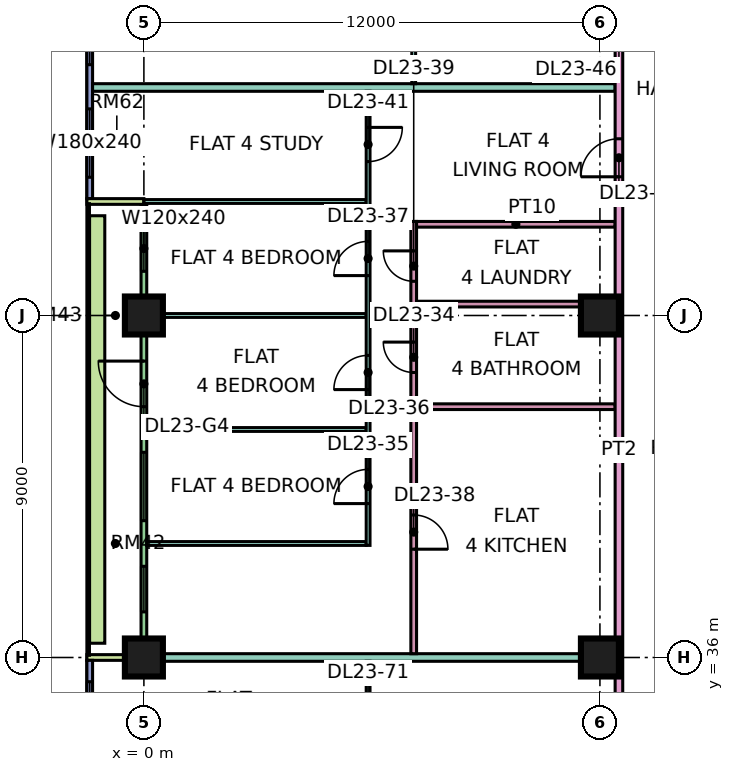
"""IFC4 building model, lengths in metres.
Left out: names, types, materials, properties, quantities, classifications, styles, units other than length and angle.
Written with IfcOpenShell. Run it as: python <this file> out.ifc"""

import sys

from ifc_helpers import new_model, si_unit, direction, frame, frame_2d, origin, origin_2d, place, context, subcontext, project, spatial, rectangle, extrude, element, fill, save


model = new_model("IFC4")
c1 = context("Model", 3, precision=1e-05, world=origin(), true_north=direction((0.0, 1.0)))
c2 = subcontext(c1, "Body", "Model", "MODEL_VIEW")
j1 = project(units=[si_unit("LENGTHUNIT", "METRE"), si_unit("PLANEANGLEUNIT", "RADIAN")], contexts=[c1])
p1 = place(None, origin())
s1 = spatial("IfcSite", under=j1, at=p1, CompositionType="ELEMENT")
p2 = place(p1, origin())
s2 = spatial("IfcBuilding", under=s1, at=p2, CompositionType="ELEMENT")
p3 = place(p2, frame((0.0, 0.0, 103.15)))
s3 = spatial("IfcBuildingStorey", under=s2, at=p3, CompositionType="ELEMENT", Elevation=103.15)
p4 = place(p3, frame((0.0, 36.0, 0.0), z_axis=(0.0, 0.0, 1.0), x_axis=(1.0, 0.0, 0.0)))
e1 = element("IfcColumn", 1, at=p4, inside=s3, PredefinedType="COLUMN", context=c2, shape_type="SweptSolid", body=[
    extrude(rectangle(XDim=1.0, YDim=1.0, at=origin_2d()), origin(), (0.0, 0.0, 1.0), 3.75),
])
for number, where, z_axis, x_axis in (
    (2, (0.0, 45.0, 0.0), (0.0, 0.0, 1.0), (1.0, 0.0, 0.0)),
    (3, (12.0, 36.0, 0.0), (0.0, 0.0, 1.0), (1.0, 0.0, 0.0)),
    (4, (12.0, 45.0, 0.0), (0.0, 0.0, 1.0), (1.0, 0.0, 0.0)),
):
    element("IfcColumn", number, at=place(p3, frame(where, z_axis=z_axis, x_axis=x_axis)), inside=s3, PredefinedType="COLUMN", context=c2, shape_type="SweptSolid", body=[
        extrude(rectangle(XDim=1.0, YDim=1.0, at=origin_2d()), origin(), (0.0, 0.0, 1.0), 3.75),
    ])
p5 = place(p3, frame((-1.425, 61.5, 0.0), z_axis=(0.0, 0.0, 1.0), x_axis=(0.0, -1.0, 0.0)))
e5 = element("IfcWall", 5, at=p5, inside=s3, PredefinedType="SOLIDWALL", context=c2, shape_type="SweptSolid", body=[
    extrude(rectangle(XDim=13.425, YDim=0.15, at=frame_2d((6.712, 0.0))), origin(), (0.0, 0.0, 1.0), 3.35),
])
p6 = place(p5, frame((0.3, 0.0, 0.45)))
e6 = element("IfcOpeningElement", 6, at=p6, cuts=e5, PredefinedType="OPENING", context=c2, shape_type="SweptSolid", body=[
    extrude(rectangle(XDim=0.9, YDim=2.4, at=frame_2d((0.45, 1.2))), frame((0.0, 0.085, 0.0), z_axis=(0.0, -1.0, 0.0), x_axis=(1.0, 0.0, 0.0)), (0.0, 0.0, 1.0), 0.17),
])
p7 = place(p5, frame((2.1, 0.0, 0.45)))
e7 = element("IfcOpeningElement", 7, at=p7, cuts=e5, PredefinedType="OPENING", context=c2, shape_type="SweptSolid", body=[
    extrude(rectangle(XDim=4.8, YDim=2.4, at=frame_2d((2.4, 1.2))), frame((0.0, 0.085, 0.0), z_axis=(0.0, -1.0, 0.0), x_axis=(1.0, 0.0, 0.0)), (0.0, 0.0, 1.0), 0.17),
])
p8 = place(p5, frame((8.1, 0.0, 0.45)))
e8 = element("IfcOpeningElement", 8, at=p8, cuts=e5, PredefinedType="OPENING", context=c2, shape_type="SweptSolid", body=[
    extrude(rectangle(XDim=1.8, YDim=2.4, at=frame_2d((0.9, 1.2))), frame((0.0, 0.085, 0.0), z_axis=(0.0, -1.0, 0.0), x_axis=(1.0, 0.0, 0.0)), (0.0, 0.0, 1.0), 0.17),
])
p9 = place(p5, frame((11.062, 0.0, 0.45)))
e9 = element("IfcOpeningElement", 9, at=p9, cuts=e5, PredefinedType="OPENING", context=c2, shape_type="SweptSolid", body=[
    extrude(rectangle(XDim=1.8, YDim=2.4, at=frame_2d((0.9, 1.2))), frame((0.0, 0.085, 0.0), z_axis=(0.0, -1.0, 0.0), x_axis=(1.0, 0.0, 0.0)), (0.0, 0.0, 1.0), 0.17),
])
p10 = place(p3, frame((0.0, 47.925, 0.0), z_axis=(0.0, 0.0, 1.0), x_axis=(0.0, -1.0, 0.0)))
e10 = element("IfcWall", 10, at=p10, inside=s3, PredefinedType="SOLIDWALL", context=c2, shape_type="SweptSolid", body=[
    extrude(rectangle(XDim=11.85, YDim=0.15, at=frame_2d((5.925, 0.0))), origin(), (0.0, 0.0, 1.0), 3.35),
])
p11 = place(p10, frame((0.562, 0.0, 0.45)))
e11 = element("IfcOpeningElement", 11, at=p11, cuts=e10, PredefinedType="OPENING", context=c2, shape_type="SweptSolid", body=[
    extrude(rectangle(XDim=1.2, YDim=2.4, at=frame_2d((0.6, 1.2))), frame((0.0, 0.085, 0.0), z_axis=(0.0, -1.0, 0.0), x_axis=(1.0, 0.0, 0.0)), (0.0, 0.0, 1.0), 0.17),
])
p12 = place(p10, frame((4.125, 0.0, 0.0)))
e12 = element("IfcOpeningElement", 12, at=p12, cuts=e10, PredefinedType="OPENING", context=c2, shape_type="SweptSolid", body=[
    extrude(rectangle(XDim=1.2, YDim=2.4, at=frame_2d((0.6, 1.2))), frame((0.0, 0.085, 0.0), z_axis=(0.0, -1.0, 0.0), x_axis=(1.0, 0.0, 0.0)), (0.0, 0.0, 1.0), 0.17),
])
p13 = place(p10, frame((6.525, 0.0, 0.45)))
e13 = element("IfcOpeningElement", 13, at=p13, cuts=e10, PredefinedType="OPENING", context=c2, shape_type="SweptSolid", body=[
    extrude(rectangle(XDim=1.8, YDim=2.4, at=frame_2d((0.9, 1.2))), frame((0.0, 0.085, 0.0), z_axis=(0.0, -1.0, 0.0), x_axis=(1.0, 0.0, 0.0)), (0.0, 0.0, 1.0), 0.17),
])
p14 = place(p10, frame((9.525, 0.0, 0.45)))
e14 = element("IfcOpeningElement", 14, at=p14, cuts=e10, PredefinedType="OPENING", context=c2, shape_type="SweptSolid", body=[
    extrude(rectangle(XDim=1.2, YDim=2.4, at=frame_2d((0.6, 1.2))), frame((0.0, 0.085, 0.0), z_axis=(0.0, -1.0, 0.0), x_axis=(1.0, 0.0, 0.0)), (0.0, 0.0, 1.0), 0.17),
])
for number, where, z_axis, x_axis in (
    (15, (-1.5, 48.0, 0.0), (0.0, 0.0, 1.0), (1.0, 0.0, 0.0)),
    (16, (-1.5, 36.0, 0.0), (0.0, 0.0, 1.0), (1.0, 0.0, 0.0)),
):
    element("IfcWall", number, at=place(p3, frame(where, z_axis=z_axis, x_axis=x_axis)), inside=s3, PredefinedType="SOLIDWALL", context=c2, shape_type="SweptSolid", body=[
        extrude(rectangle(XDim=1.5, YDim=0.15, at=frame_2d((0.75, 0.0))), origin(), (0.0, 0.0, 1.0), 3.35),
    ])
p15 = place(p3, frame((-1.425, 35.925, 0.0), z_axis=(0.0, 0.0, 1.0), x_axis=(0.0, -1.0, 0.0)))
e17 = element("IfcWall", 17, at=p15, inside=s3, PredefinedType="SOLIDWALL", context=c2, shape_type="SweptSolid", body=[
    extrude(rectangle(XDim=11.85, YDim=0.15, at=frame_2d((5.925, 0.0))), origin(), (0.0, 0.0, 1.0), 3.35),
])
p16 = place(p15, frame((0.562, 0.0, 0.45)))
e18 = element("IfcOpeningElement", 18, at=p16, cuts=e17, PredefinedType="OPENING", context=c2, shape_type="SweptSolid", body=[
    extrude(rectangle(XDim=1.8, YDim=2.4, at=frame_2d((0.9, 1.2))), frame((0.0, 0.085, 0.0), z_axis=(0.0, -1.0, 0.0), x_axis=(1.0, 0.0, 0.0)), (0.0, 0.0, 1.0), 0.17),
])
p17 = place(p15, frame((3.525, 0.0, 0.45)))
e19 = element("IfcOpeningElement", 19, at=p17, cuts=e17, PredefinedType="OPENING", context=c2, shape_type="SweptSolid", body=[
    extrude(rectangle(XDim=4.8, YDim=2.4, at=frame_2d((2.4, 1.2))), frame((0.0, 0.085, 0.0), z_axis=(0.0, -1.0, 0.0), x_axis=(1.0, 0.0, 0.0)), (0.0, 0.0, 1.0), 0.17),
])
p18 = place(p15, frame((9.488, 0.0, 0.45)))
e20 = element("IfcOpeningElement", 20, at=p18, cuts=e17, PredefinedType="OPENING", context=c2, shape_type="SweptSolid", body=[
    extrude(rectangle(XDim=1.8, YDim=2.4, at=frame_2d((0.9, 1.2))), frame((0.0, 0.085, 0.0), z_axis=(0.0, -1.0, 0.0), x_axis=(1.0, 0.0, 0.0)), (0.0, 0.0, 1.0), 0.17),
])
p19 = place(p3, frame((-1.229, 47.625, 0.0), z_axis=(0.0, 0.0, 1.0), x_axis=(0.0, -1.0, 0.0)))
e21 = element("IfcWall", 21, at=p19, inside=s3, PredefinedType="SOLIDWALL", context=c2, shape_type="SweptSolid", body=[
    extrude(rectangle(XDim=11.25, YDim=0.4, at=frame_2d((5.625, 0.0))), origin(), (0.0, 0.0, 1.0), 0.7),
])
e22 = element("IfcWall", 22, at=p4, inside=s3, PredefinedType="PARTITIONING", context=c2, shape_type="SweptSolid", body=[
    extrude(rectangle(XDim=12.4, YDim=0.2, at=frame_2d((6.2, 0.0))), origin(), (0.0, 0.0, 1.0), 3.35),
])
p20 = place(p3, frame((0.0, 48.0, 0.0), z_axis=(0.0, 0.0, 1.0), x_axis=(1.0, 0.0, 0.0)))
e23 = element("IfcWall", 23, at=p20, inside=s3, PredefinedType="PARTITIONING", context=c2, shape_type="SweptSolid", body=[
    extrude(rectangle(XDim=5.85, YDim=0.1, at=frame_2d((2.925, 0.0))), origin(), (0.0, 0.0, 1.0), 3.35),
])
p21 = place(p3, frame((-1.35, 51.0, 0.0), z_axis=(0.0, 0.0, 1.0), x_axis=(1.0, 0.0, 0.0)))
e24 = element("IfcWall", 24, at=p21, inside=s3, PredefinedType="PARTITIONING", context=c2, shape_type="SweptSolid", body=[
    extrude(rectangle(XDim=13.75, YDim=0.2, at=frame_2d((6.875, 0.0))), origin(), (0.0, 0.0, 1.0), 3.35),
])
for number, where, z_axis, x_axis in (
    (25, (0.074, 39.0, 0.0), (0.0, 0.0, 1.0), (1.0, 0.0, 0.0)),
    (26, (0.074, 42.0, 0.0), (0.0, 0.0, 1.0), (1.0, 0.0, 0.0)),
    (27, (0.074, 45.0, 0.0), (0.0, 0.0, 1.0), (1.0, 0.0, 0.0)),
):
    element("IfcWall", number, at=place(p3, frame(where, z_axis=z_axis, x_axis=x_axis)), inside=s3, PredefinedType="PARTITIONING", context=c2, shape_type="SweptSolid", body=[
        extrude(rectangle(XDim=5.776, YDim=0.1, at=frame_2d((2.888, 0.0))), origin(), (0.0, 0.0, 1.0), 3.35),
    ])
p22 = place(p3, frame((5.9, 33.05, 0.0), z_axis=(0.0, 0.0, 1.0), x_axis=(0.0, 1.0, 0.0)))
e28 = element("IfcWall", 28, at=p22, inside=s3, PredefinedType="PARTITIONING", context=c2, shape_type="SweptSolid", body=[
    extrude(rectangle(XDim=2.85, YDim=0.1, at=frame_2d((1.425, 0.0))), origin(), (0.0, 0.0, 1.0), 3.35),
])
p23 = place(p22, frame((1.0, 0.0, 0.0)))
e29 = element("IfcOpeningElement", 29, at=p23, cuts=e28, PredefinedType="OPENING", context=c2, shape_type="SweptSolid", body=[
    extrude(rectangle(XDim=0.9, YDim=2.1, at=frame_2d((0.45, 1.05))), frame((0.0, 0.06, 0.0), z_axis=(0.0, -1.0, 0.0), x_axis=(1.0, 0.0, 0.0)), (0.0, 0.0, 1.0), 0.12),
])
p24 = place(p3, frame((5.9, 38.95, 0.0), z_axis=(0.0, 0.0, 1.0), x_axis=(0.0, 1.0, 0.0)))
e30 = element("IfcWall", 30, at=p24, inside=s3, PredefinedType="PARTITIONING", context=c2, shape_type="SweptSolid", body=[
    extrude(rectangle(XDim=11.95, YDim=0.1, at=frame_2d((5.975, 0.0))), origin(), (0.0, 0.0, 1.0), 3.35),
])
p25 = place(p24, frame((1.1, 0.0, 0.0)))
e31 = element("IfcOpeningElement", 31, at=p25, cuts=e30, PredefinedType="OPENING", context=c2, shape_type="SweptSolid", body=[
    extrude(rectangle(XDim=0.9, YDim=2.1, at=frame_2d((0.45, 1.05))), frame((0.0, 0.06, 0.0), z_axis=(0.0, -1.0, 0.0), x_axis=(1.0, 0.0, 0.0)), (0.0, 0.0, 1.0), 0.12),
])
p26 = place(p24, frame((4.1, 0.0, 0.0)))
e32 = element("IfcOpeningElement", 32, at=p26, cuts=e30, PredefinedType="OPENING", context=c2, shape_type="SweptSolid", body=[
    extrude(rectangle(XDim=0.9, YDim=2.1, at=frame_2d((0.45, 1.05))), frame((0.0, 0.06, 0.0), z_axis=(0.0, -1.0, 0.0), x_axis=(1.0, 0.0, 0.0)), (0.0, 0.0, 1.0), 0.12),
])
p27 = place(p24, frame((7.1, 0.0, 0.0)))
e33 = element("IfcOpeningElement", 33, at=p27, cuts=e30, PredefinedType="OPENING", context=c2, shape_type="SweptSolid", body=[
    extrude(rectangle(XDim=0.9, YDim=2.1, at=frame_2d((0.45, 1.05))), frame((0.0, 0.06, 0.0), z_axis=(0.0, -1.0, 0.0), x_axis=(1.0, 0.0, 0.0)), (0.0, 0.0, 1.0), 0.12),
])
p28 = place(p24, frame((10.1, 0.0, 0.0)))
e34 = element("IfcOpeningElement", 34, at=p28, cuts=e30, PredefinedType="OPENING", context=c2, shape_type="SweptSolid", body=[
    extrude(rectangle(XDim=0.9, YDim=2.1, at=frame_2d((0.45, 1.05))), frame((0.0, 0.06, 0.0), z_axis=(0.0, -1.0, 0.0), x_axis=(1.0, 0.0, 0.0)), (0.0, 0.0, 1.0), 0.12),
])
p29 = place(p3, frame((7.1, 36.1, 0.0), z_axis=(0.0, 0.0, 1.0), x_axis=(0.0, 1.0, 0.0)))
e35 = element("IfcWall", 35, at=p29, inside=s3, PredefinedType="PARTITIONING", context=c2, shape_type="SweptSolid", body=[
    extrude(rectangle(XDim=11.375, YDim=0.15, at=frame_2d((5.688, 0.0))), origin(), (0.0, 0.0, 1.0), 3.35),
])
p30 = place(p29, frame((7.4, 0.0, 0.0)))
e36 = element("IfcOpeningElement", 36, at=p30, cuts=e35, PredefinedType="OPENING", context=c2, shape_type="SweptSolid", body=[
    extrude(rectangle(XDim=0.8, YDim=2.1, at=frame_2d((0.4, 1.05))), frame((0.0, 0.085, 0.0), z_axis=(0.0, -1.0, 0.0), x_axis=(1.0, 0.0, 0.0)), (0.0, 0.0, 1.0), 0.17),
])
p31 = place(p29, frame((2.75, 0.0, 0.0)))
e37 = element("IfcOpeningElement", 37, at=p31, cuts=e35, PredefinedType="OPENING", context=c2, shape_type="SweptSolid", body=[
    extrude(rectangle(XDim=0.9, YDim=2.1, at=frame_2d((0.45, 1.05))), frame((0.0, 0.085, 0.0), z_axis=(0.0, -1.0, 0.0), x_axis=(1.0, 0.0, 0.0)), (0.0, 0.0, 1.0), 0.17),
])
p32 = place(p29, frame((9.8, 0.0, 0.0)))
e38 = element("IfcOpeningElement", 38, at=p32, cuts=e35, PredefinedType="OPENING", context=c2, shape_type="SweptSolid", body=[
    extrude(rectangle(XDim=0.8, YDim=2.1, at=frame_2d((0.4, 1.05))), frame((0.0, 0.085, 0.0), z_axis=(0.0, -1.0, 0.0), x_axis=(1.0, 0.0, 0.0)), (0.0, 0.0, 1.0), 0.17),
])
p33 = place(p3, frame((7.1, 51.1, 0.0), z_axis=(0.0, 0.0, 1.0), x_axis=(0.0, 1.0, 0.0)))
e39 = element("IfcWall", 39, at=p33, inside=s3, PredefinedType="PARTITIONING", context=c2, shape_type="SweptSolid", body=[
    extrude(rectangle(XDim=2.85, YDim=0.1, at=frame_2d((1.425, 0.0))), origin(), (0.0, 0.0, 1.0), 3.35),
])
p34 = place(p33, frame((0.95, 0.0, 0.0)))
e40 = element("IfcOpeningElement", 40, at=p34, cuts=e39, PredefinedType="OPENING", context=c2, shape_type="SweptSolid", body=[
    extrude(rectangle(XDim=0.9, YDim=2.1, at=frame_2d((0.45, 1.05))), frame((0.0, 0.06, 0.0), z_axis=(0.0, -1.0, 0.0), x_axis=(1.0, 0.0, 0.0)), (0.0, 0.0, 1.0), 0.12),
])
for number, where, z_axis, x_axis in (
    (41, (7.175, 42.6, 0.0), (0.0, 0.0, 1.0), (1.0, 0.0, 0.0)),
    (42, (7.175, 45.3, 0.0), (0.0, 0.0, 1.0), (1.0, 0.0, 0.0)),
    (43, (7.175, 47.4, 0.0), (0.0, 0.0, 1.0), (1.0, 0.0, 0.0)),
):
    element("IfcWall", number, at=place(p3, frame(where, z_axis=z_axis, x_axis=x_axis)), inside=s3, PredefinedType="PARTITIONING", context=c2, shape_type="SweptSolid", body=[
        extrude(rectangle(XDim=5.225, YDim=0.15, at=frame_2d((2.612, 0.0))), origin(), (0.0, 0.0, 1.0), 3.35),
    ])
p35 = place(p3, frame((12.5, 20.0, 0.0), z_axis=(0.0, 0.0, 1.0), x_axis=(0.0, 1.0, 0.0)))
e44 = element("IfcWall", 44, at=p35, inside=s3, PredefinedType="PARTITIONING", context=c2, shape_type="SweptSolid", body=[
    extrude(rectangle(XDim=42.926, YDim=0.2, at=frame_2d((21.463, 0.0))), origin(), (0.0, 0.0, 1.0), 3.35),
])
p36 = place(p35, frame((28.65, 0.0, 0.0)))
e45 = element("IfcOpeningElement", 45, at=p36, cuts=e44, PredefinedType="OPENING", context=c2, shape_type="SweptSolid", body=[
    extrude(rectangle(XDim=1.0, YDim=2.1, at=frame_2d((0.5, 1.05))), frame((0.0, 0.11, 0.0), z_axis=(0.0, -1.0, 0.0), x_axis=(1.0, 0.0, 0.0)), (0.0, 0.0, 1.0), 0.22),
])
p37 = place(p35, frame((32.1, 0.0, 0.0)))
e46 = element("IfcOpeningElement", 46, at=p37, cuts=e44, PredefinedType="OPENING", context=c2, shape_type="SweptSolid", body=[
    extrude(rectangle(XDim=1.0, YDim=2.1, at=frame_2d((0.5, 1.05))), frame((0.0, 0.11, 0.0), z_axis=(0.0, -1.0, 0.0), x_axis=(1.0, 0.0, 0.0)), (0.0, 0.0, 1.0), 0.22),
])
p38 = place(p35, frame((0.6, 0.0, 0.0)))
e47 = element("IfcOpeningElement", 47, at=p38, cuts=e44, PredefinedType="OPENING", context=c2, shape_type="SweptSolid", body=[
    extrude(rectangle(XDim=1.2, YDim=2.1, at=frame_2d((0.6, 1.05))), frame((0.0, 0.11, 0.0), z_axis=(0.0, -1.0, 0.0), x_axis=(1.0, 0.0, 0.0)), (0.0, 0.0, 1.0), 0.22),
])
p39 = place(p35, frame((13.95, 0.0, 0.0)))
e48 = element("IfcOpeningElement", 48, at=p39, cuts=e44, PredefinedType="OPENING", context=c2, shape_type="SweptSolid", body=[
    extrude(rectangle(XDim=1.0, YDim=2.1, at=frame_2d((0.5, 1.05))), frame((0.0, 0.11, 0.0), z_axis=(0.0, -1.0, 0.0), x_axis=(1.0, 0.0, 0.0)), (0.0, 0.0, 1.0), 0.22),
])
p40 = place(p8, origin())
e49 = element("IfcWindow", 49, at=p40, inside=s3, PartitioningType="SINGLE_PANEL", PredefinedType="WINDOW", context=c2, shape_type="SweptSolid", body=[
    extrude(rectangle(XDim=1.8, YDim=2.4, at=frame_2d((0.9, 1.2))), frame((0.0, 0.03, 0.0), z_axis=(0.0, -1.0, 0.0), x_axis=(1.0, 0.0, 0.0)), (0.0, 0.0, 1.0), 0.06),
])
fill(e8, e49)
p41 = place(p9, origin())
e50 = element("IfcWindow", 50, at=p41, inside=s3, PartitioningType="SINGLE_PANEL", PredefinedType="WINDOW", context=c2, shape_type="SweptSolid", body=[
    extrude(rectangle(XDim=1.8, YDim=2.4, at=frame_2d((0.9, 1.2))), frame((0.0, 0.03, 0.0), z_axis=(0.0, -1.0, 0.0), x_axis=(1.0, 0.0, 0.0)), (0.0, 0.0, 1.0), 0.06),
])
fill(e9, e50)
p42 = place(p11, origin())
e51 = element("IfcWindow", 51, at=p42, inside=s3, PartitioningType="SINGLE_PANEL", PredefinedType="WINDOW", context=c2, shape_type="SweptSolid", body=[
    extrude(rectangle(XDim=1.2, YDim=2.4, at=frame_2d((0.6, 1.2))), frame((0.0, 0.03, 0.0), z_axis=(0.0, -1.0, 0.0), x_axis=(1.0, 0.0, 0.0)), (0.0, 0.0, 1.0), 0.06),
])
fill(e11, e51)
p43 = place(p12, frame((1.2, 0.0, 0.0), z_axis=(0.0, 0.0, 1.0), x_axis=(-1.0, 0.0, 0.0)))
e52 = element("IfcDoor", 52, at=p43, inside=s3, OperationType="DOUBLE_DOOR_SINGLE_SWING", PredefinedType="DOOR", context=c2, shape_type="SweptSolid", body=[
    extrude(rectangle(XDim=1.2, YDim=2.4, at=frame_2d((0.6, 1.2))), frame((0.0, 0.025, 0.0), z_axis=(0.0, -1.0, 0.0), x_axis=(1.0, 0.0, 0.0)), (0.0, 0.0, 1.0), 0.05),
])
fill(e12, e52)
p44 = place(p13, origin())
e53 = element("IfcWindow", 53, at=p44, inside=s3, PartitioningType="SINGLE_PANEL", PredefinedType="WINDOW", context=c2, shape_type="SweptSolid", body=[
    extrude(rectangle(XDim=1.8, YDim=2.4, at=frame_2d((0.9, 1.2))), frame((0.0, 0.03, 0.0), z_axis=(0.0, -1.0, 0.0), x_axis=(1.0, 0.0, 0.0)), (0.0, 0.0, 1.0), 0.06),
])
fill(e13, e53)
p45 = place(p14, origin())
e54 = element("IfcWindow", 54, at=p45, inside=s3, PartitioningType="SINGLE_PANEL", PredefinedType="WINDOW", context=c2, shape_type="SweptSolid", body=[
    extrude(rectangle(XDim=1.2, YDim=2.4, at=frame_2d((0.6, 1.2))), frame((0.0, 0.03, 0.0), z_axis=(0.0, -1.0, 0.0), x_axis=(1.0, 0.0, 0.0)), (0.0, 0.0, 1.0), 0.06),
])
fill(e14, e54)
p46 = place(p16, origin())
e55 = element("IfcWindow", 55, at=p46, inside=s3, PartitioningType="SINGLE_PANEL", PredefinedType="WINDOW", context=c2, shape_type="SweptSolid", body=[
    extrude(rectangle(XDim=1.8, YDim=2.4, at=frame_2d((0.9, 1.2))), frame((0.0, 0.03, 0.0), z_axis=(0.0, -1.0, 0.0), x_axis=(1.0, 0.0, 0.0)), (0.0, 0.0, 1.0), 0.06),
])
fill(e18, e55)
p47 = place(p30, frame((0.8, 0.0, 0.0), z_axis=(0.0, 0.0, 1.0), x_axis=(-1.0, 0.0, 0.0)))
e56 = element("IfcDoor", 56, at=p47, inside=s3, OperationType="SINGLE_SWING_RIGHT", PredefinedType="DOOR", context=c2, shape_type="SweptSolid", body=[
    extrude(rectangle(XDim=0.8, YDim=2.1, at=frame_2d((0.4, 1.05))), frame((0.0, 0.025, 0.0), z_axis=(0.0, -1.0, 0.0), x_axis=(1.0, 0.0, 0.0)), (0.0, 0.0, 1.0), 0.05),
])
fill(e36, e56)
p48 = place(p25, origin())
e57 = element("IfcDoor", 57, at=p48, inside=s3, OperationType="SINGLE_SWING_LEFT", PredefinedType="DOOR", context=c2, shape_type="SweptSolid", body=[
    extrude(rectangle(XDim=0.9, YDim=2.1, at=frame_2d((0.45, 1.05))), frame((0.0, 0.025, 0.0), z_axis=(0.0, -1.0, 0.0), x_axis=(1.0, 0.0, 0.0)), (0.0, 0.0, 1.0), 0.05),
])
fill(e31, e57)
p49 = place(p26, origin())
e58 = element("IfcDoor", 58, at=p49, inside=s3, OperationType="SINGLE_SWING_LEFT", PredefinedType="DOOR", context=c2, shape_type="SweptSolid", body=[
    extrude(rectangle(XDim=0.9, YDim=2.1, at=frame_2d((0.45, 1.05))), frame((0.0, 0.025, 0.0), z_axis=(0.0, -1.0, 0.0), x_axis=(1.0, 0.0, 0.0)), (0.0, 0.0, 1.0), 0.05),
])
fill(e32, e58)
p50 = place(p27, origin())
e59 = element("IfcDoor", 59, at=p50, inside=s3, OperationType="SINGLE_SWING_LEFT", PredefinedType="DOOR", context=c2, shape_type="SweptSolid", body=[
    extrude(rectangle(XDim=0.9, YDim=2.1, at=frame_2d((0.45, 1.05))), frame((0.0, 0.025, 0.0), z_axis=(0.0, -1.0, 0.0), x_axis=(1.0, 0.0, 0.0)), (0.0, 0.0, 1.0), 0.05),
])
fill(e33, e59)
p51 = place(p31, frame((0.9, 0.0, 0.0), z_axis=(0.0, 0.0, 1.0), x_axis=(-1.0, 0.0, 0.0)))
e60 = element("IfcDoor", 60, at=p51, inside=s3, OperationType="SINGLE_SWING_LEFT", PredefinedType="DOOR", context=c2, shape_type="SweptSolid", body=[
    extrude(rectangle(XDim=0.9, YDim=2.1, at=frame_2d((0.45, 1.05))), frame((0.0, 0.025, 0.0), z_axis=(0.0, -1.0, 0.0), x_axis=(1.0, 0.0, 0.0)), (0.0, 0.0, 1.0), 0.05),
])
fill(e37, e60)
p52 = place(p32, frame((0.8, 0.0, 0.0), z_axis=(0.0, 0.0, 1.0), x_axis=(-1.0, 0.0, 0.0)))
e61 = element("IfcDoor", 61, at=p52, inside=s3, OperationType="SINGLE_SWING_RIGHT", PredefinedType="DOOR", context=c2, shape_type="SweptSolid", body=[
    extrude(rectangle(XDim=0.8, YDim=2.1, at=frame_2d((0.4, 1.05))), frame((0.0, 0.025, 0.0), z_axis=(0.0, -1.0, 0.0), x_axis=(1.0, 0.0, 0.0)), (0.0, 0.0, 1.0), 0.05),
])
fill(e38, e61)
p53 = place(p36, origin())
e62 = element("IfcDoor", 62, at=p53, inside=s3, OperationType="SINGLE_SWING_LEFT", PredefinedType="DOOR", context=c2, shape_type="SweptSolid", body=[
    extrude(rectangle(XDim=1.0, YDim=2.1, at=frame_2d((0.5, 1.05))), frame((0.0, 0.025, 0.0), z_axis=(0.0, -1.0, 0.0), x_axis=(1.0, 0.0, 0.0)), (0.0, 0.0, 1.0), 0.05),
])
fill(e45, e62)
p54 = place(p28, origin())
e63 = element("IfcDoor", 63, at=p54, inside=s3, OperationType="SINGLE_SWING_RIGHT", PredefinedType="DOOR", context=c2, shape_type="SweptSolid", body=[
    extrude(rectangle(XDim=0.9, YDim=2.1, at=frame_2d((0.45, 1.05))), frame((0.0, 0.025, 0.0), z_axis=(0.0, -1.0, 0.0), x_axis=(1.0, 0.0, 0.0)), (0.0, 0.0, 1.0), 0.05),
])
fill(e34, e63)
save(model, sys.argv[1])
